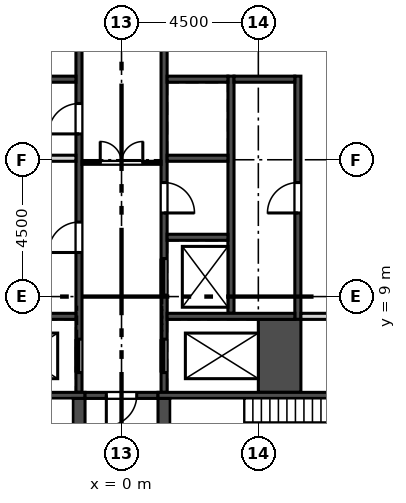
"""IFC4 building model, lengths in metres.
Left out: names, types, materials, properties, quantities, classifications, styles, units other than length and angle.
Written with IfcOpenShell. Run it as: python <this file> out.ifc"""

import sys

from ifc_helpers import new_model, si_unit, direction, frame, frame_2d, origin, place, context, subcontext, project, spatial, rectangle, extrude, element, fill, save


model = new_model("IFC4")
c1 = context("Model", 3, precision=1e-05, world=origin(), true_north=direction((0.0, 1.0)))
c2 = subcontext(c1, "Body", "Model", "MODEL_VIEW")
j1 = project(units=[si_unit("LENGTHUNIT", "METRE"), si_unit("PLANEANGLEUNIT", "RADIAN")], contexts=[c1])
p1 = place(None, origin())
s1 = spatial("IfcSite", under=j1, at=p1, CompositionType="ELEMENT")
p2 = place(p1, origin())
s2 = spatial("IfcBuilding", under=s1, at=p2, CompositionType="ELEMENT")
p3 = place(p2, frame((0.0, 0.0, 335.1)))
s3 = spatial("IfcBuildingStorey", under=s2, at=p3, CompositionType="ELEMENT", Elevation=335.1)
p4 = place(p3, frame((23.788, 7.709, 0.0), z_axis=(0.0, 0.0, 1.0), x_axis=(-0.500001731347, 0.866024404189, 0.0)))
e1 = element("IfcWall", 1, at=p4, inside=s3, PredefinedType="SOLIDWALL", context=c2, shape_type="SweptSolid", body=[
    extrude(rectangle(XDim=38.87, YDim=0.34, at=frame_2d((19.435, 0.0))), origin(), (0.0, 0.0, 1.0), 3.8),
])
p5 = place(p4, frame((3.218, 0.0, 0.9)))
e2 = element("IfcOpeningElement", 2, at=p5, cuts=e1, PredefinedType="OPENING", context=c2, shape_type="SweptSolid", body=[
    extrude(rectangle(XDim=1.885, YDim=2.6, at=frame_2d((0.942, 1.3))), frame((0.0, 0.18, 0.0), z_axis=(0.0, -1.0, 0.0), x_axis=(1.0, 0.0, 0.0)), (0.0, 0.0, 1.0), 0.36),
])
p6 = place(p4, frame((6.218, 0.0, 0.9)))
e3 = element("IfcOpeningElement", 3, at=p6, cuts=e1, PredefinedType="OPENING", context=c2, shape_type="SweptSolid", body=[
    extrude(rectangle(XDim=1.885, YDim=2.6, at=frame_2d((0.942, 1.3))), frame((0.0, 0.18, 0.0), z_axis=(0.0, -1.0, 0.0), x_axis=(1.0, 0.0, 0.0)), (0.0, 0.0, 1.0), 0.36),
])
p7 = place(p4, frame((9.218, 0.0, 0.9)))
e4 = element("IfcOpeningElement", 4, at=p7, cuts=e1, PredefinedType="OPENING", context=c2, shape_type="SweptSolid", body=[
    extrude(rectangle(XDim=1.885, YDim=2.6, at=frame_2d((0.942, 1.3))), frame((0.0, 0.18, 0.0), z_axis=(0.0, -1.0, 0.0), x_axis=(1.0, 0.0, 0.0)), (0.0, 0.0, 1.0), 0.36),
])
p8 = place(p4, frame((12.218, 0.0, 0.9)))
e5 = element("IfcOpeningElement", 5, at=p8, cuts=e1, PredefinedType="OPENING", context=c2, shape_type="SweptSolid", body=[
    extrude(rectangle(XDim=1.885, YDim=2.6, at=frame_2d((0.942, 1.3))), frame((0.0, 0.18, 0.0), z_axis=(0.0, -1.0, 0.0), x_axis=(1.0, 0.0, 0.0)), (0.0, 0.0, 1.0), 0.36),
])
p9 = place(p4, frame((15.218, 0.0, 0.9)))
e6 = element("IfcOpeningElement", 6, at=p9, cuts=e1, PredefinedType="OPENING", context=c2, shape_type="SweptSolid", body=[
    extrude(rectangle(XDim=1.885, YDim=2.6, at=frame_2d((0.942, 1.3))), frame((0.0, 0.18, 0.0), z_axis=(0.0, -1.0, 0.0), x_axis=(1.0, 0.0, 0.0)), (0.0, 0.0, 1.0), 0.36),
])
p10 = place(p4, frame((18.218, 0.0, 0.9)))
e7 = element("IfcOpeningElement", 7, at=p10, cuts=e1, PredefinedType="OPENING", context=c2, shape_type="SweptSolid", body=[
    extrude(rectangle(XDim=1.885, YDim=2.6, at=frame_2d((0.942, 1.3))), frame((0.0, 0.18, 0.0), z_axis=(0.0, -1.0, 0.0), x_axis=(1.0, 0.0, 0.0)), (0.0, 0.0, 1.0), 0.36),
])
p11 = place(p4, frame((21.218, 0.0, 0.9)))
e8 = element("IfcOpeningElement", 8, at=p11, cuts=e1, PredefinedType="OPENING", context=c2, shape_type="SweptSolid", body=[
    extrude(rectangle(XDim=1.885, YDim=2.6, at=frame_2d((0.942, 1.3))), frame((0.0, 0.18, 0.0), z_axis=(0.0, -1.0, 0.0), x_axis=(1.0, 0.0, 0.0)), (0.0, 0.0, 1.0), 0.36),
])
p12 = place(p4, frame((24.218, 0.0, 0.9)))
e9 = element("IfcOpeningElement", 9, at=p12, cuts=e1, PredefinedType="OPENING", context=c2, shape_type="SweptSolid", body=[
    extrude(rectangle(XDim=1.885, YDim=2.6, at=frame_2d((0.942, 1.3))), frame((0.0, 0.18, 0.0), z_axis=(0.0, -1.0, 0.0), x_axis=(1.0, 0.0, 0.0)), (0.0, 0.0, 1.0), 0.36),
])
p13 = place(p4, frame((27.218, 0.0, 0.9)))
e10 = element("IfcOpeningElement", 10, at=p13, cuts=e1, PredefinedType="OPENING", context=c2, shape_type="SweptSolid", body=[
    extrude(rectangle(XDim=1.885, YDim=2.6, at=frame_2d((0.942, 1.3))), frame((0.0, 0.18, 0.0), z_axis=(0.0, -1.0, 0.0), x_axis=(1.0, 0.0, 0.0)), (0.0, 0.0, 1.0), 0.36),
])
p14 = place(p4, frame((30.218, 0.0, 0.9)))
e11 = element("IfcOpeningElement", 11, at=p14, cuts=e1, PredefinedType="OPENING", context=c2, shape_type="SweptSolid", body=[
    extrude(rectangle(XDim=1.885, YDim=2.6, at=frame_2d((0.942, 1.3))), frame((0.0, 0.18, 0.0), z_axis=(0.0, -1.0, 0.0), x_axis=(1.0, 0.0, 0.0)), (0.0, 0.0, 1.0), 0.36),
])
p15 = place(p4, frame((33.218, 0.0, 0.9)))
e12 = element("IfcOpeningElement", 12, at=p15, cuts=e1, PredefinedType="OPENING", context=c2, shape_type="SweptSolid", body=[
    extrude(rectangle(XDim=1.885, YDim=2.6, at=frame_2d((0.942, 1.3))), frame((0.0, 0.18, 0.0), z_axis=(0.0, -1.0, 0.0), x_axis=(1.0, 0.0, 0.0)), (0.0, 0.0, 1.0), 0.36),
])
p16 = place(p4, frame((1.051, 0.0, 0.9)))
e13 = element("IfcOpeningElement", 13, at=p16, cuts=e1, PredefinedType="OPENING", context=c2, shape_type="SweptSolid", body=[
    extrude(rectangle(XDim=1.115, YDim=2.4, at=frame_2d((0.558, 1.2))), frame((0.0, 0.18, 0.0), z_axis=(0.0, -1.0, 0.0), x_axis=(1.0, 0.0, 0.0)), (0.0, 0.0, 1.0), 0.36),
])
p17 = place(p4, frame((36.429, 0.0, 0.9)))
e14 = element("IfcOpeningElement", 14, at=p17, cuts=e1, PredefinedType="OPENING", context=c2, shape_type="SweptSolid", body=[
    extrude(rectangle(XDim=1.115, YDim=2.4, at=frame_2d((0.558, 1.2))), frame((0.0, 0.18, 0.0), z_axis=(0.0, -1.0, 0.0), x_axis=(1.0, 0.0, 0.0)), (0.0, 0.0, 1.0), 0.36),
])
p18 = place(p3, frame((5.8, 8.25, -0.4), z_axis=(0.0, 0.0, 1.0), x_axis=(0.0, 1.0, 0.0)))
e15 = element("IfcWall", 15, at=p18, inside=s3, PredefinedType="SOLIDWALL", context=c2, shape_type="SweptSolid", body=[
    extrude(rectangle(XDim=8.0, YDim=0.2, at=frame_2d((4.0, 0.0))), origin(), (0.0, 0.0, 1.0), 4.2),
])
p19 = place(p18, frame((3.5, 0.0, 0.4)))
e16 = element("IfcOpeningElement", 16, at=p19, cuts=e15, PredefinedType="OPENING", context=c2, shape_type="SweptSolid", body=[
    extrude(rectangle(XDim=1.0, YDim=2.1, at=frame_2d((0.5, 1.05))), frame((0.0, 0.11, 0.0), z_axis=(0.0, -1.0, 0.0), x_axis=(1.0, 0.0, 0.0)), (0.0, 0.0, 1.0), 0.22),
])
p20 = place(p3, frame((3.6, 8.45, -0.4), z_axis=(0.0, 0.0, 1.0), x_axis=(0.0, 1.0, 0.0)))
e17 = element("IfcWall", 17, at=p20, inside=s3, PredefinedType="SOLIDWALL", context=c2, shape_type="SweptSolid", body=[
    extrude(rectangle(XDim=7.8, YDim=0.2, at=frame_2d((3.9, 0.0))), origin(), (0.0, 0.0, 1.0), 4.2),
])
p21 = place(p3, frame((-1.4, 5.85, -0.4), z_axis=(0.0, 0.0, 1.0), x_axis=(0.0, 1.0, 0.0)))
e18 = element("IfcWall", 18, at=p21, inside=s3, PredefinedType="SOLIDWALL", context=c2, shape_type="SweptSolid", body=[
    extrude(rectangle(XDim=11.75, YDim=0.2, at=frame_2d((5.875, 0.0))), origin(), (0.0, 0.0, 1.0), 4.2),
])
p22 = place(p21, frame((0.65, 0.0, 0.4)))
e19 = element("IfcOpeningElement", 19, at=p22, cuts=e18, PredefinedType="OPENING", context=c2, shape_type="SweptSolid", body=[
    extrude(rectangle(XDim=1.1, YDim=2.1, at=frame_2d((0.55, 1.05))), frame((0.0, 0.11, 0.0), z_axis=(0.0, -1.0, 0.0), x_axis=(1.0, 0.0, 0.0)), (0.0, 0.0, 1.0), 0.22),
])
p23 = place(p21, frame((4.6, 0.0, 0.4)))
e20 = element("IfcOpeningElement", 20, at=p23, cuts=e18, PredefinedType="OPENING", context=c2, shape_type="SweptSolid", body=[
    extrude(rectangle(XDim=1.0, YDim=2.1, at=frame_2d((0.5, 1.05))), frame((0.0, 0.11, 0.0), z_axis=(0.0, -1.0, 0.0), x_axis=(1.0, 0.0, 0.0)), (0.0, 0.0, 1.0), 0.22),
])
p24 = place(p21, frame((8.5, 0.0, 0.4)))
e21 = element("IfcOpeningElement", 21, at=p24, cuts=e18, PredefinedType="OPENING", context=c2, shape_type="SweptSolid", body=[
    extrude(rectangle(XDim=1.0, YDim=2.1, at=frame_2d((0.5, 1.05))), frame((0.0, 0.11, 0.0), z_axis=(0.0, -1.0, 0.0), x_axis=(1.0, 0.0, 0.0)), (0.0, 0.0, 1.0), 0.22),
])
p25 = place(p3, frame((1.4, 5.85, -0.4), z_axis=(0.0, 0.0, 1.0), x_axis=(0.0, 1.0, 0.0)))
e22 = element("IfcWall", 22, at=p25, inside=s3, PredefinedType="SOLIDWALL", context=c2, shape_type="SweptSolid", body=[
    extrude(rectangle(XDim=11.75, YDim=0.2, at=frame_2d((5.875, 0.0))), origin(), (0.0, 0.0, 1.0), 4.2),
])
p26 = place(p25, frame((3.2, 0.0, 0.4)))
e23 = element("IfcOpeningElement", 23, at=p26, cuts=e22, PredefinedType="OPENING", context=c2, shape_type="SweptSolid", body=[
    extrude(rectangle(XDim=1.2, YDim=2.1, at=frame_2d((0.6, 1.05))), frame((0.0, 0.11, 0.0), z_axis=(0.0, -1.0, 0.0), x_axis=(1.0, 0.0, 0.0)), (0.0, 0.0, 1.0), 0.22),
])
p27 = place(p25, frame((0.65, 0.0, 0.4)))
e24 = element("IfcOpeningElement", 24, at=p27, cuts=e22, PredefinedType="OPENING", context=c2, shape_type="SweptSolid", body=[
    extrude(rectangle(XDim=1.1, YDim=2.1, at=frame_2d((0.55, 1.05))), frame((0.0, 0.11, 0.0), z_axis=(0.0, -1.0, 0.0), x_axis=(1.0, 0.0, 0.0)), (0.0, 0.0, 1.0), 0.22),
])
p28 = place(p25, frame((5.9, 0.0, 0.4)))
e25 = element("IfcOpeningElement", 25, at=p28, cuts=e22, PredefinedType="OPENING", context=c2, shape_type="SweptSolid", body=[
    extrude(rectangle(XDim=1.0, YDim=2.1, at=frame_2d((0.5, 1.05))), frame((0.0, 0.11, 0.0), z_axis=(0.0, -1.0, 0.0), x_axis=(1.0, 0.0, 0.0)), (0.0, 0.0, 1.0), 0.22),
])
p29 = place(p3, frame((5.2, 5.85, -0.4), z_axis=(0.0, 0.0, 1.0), x_axis=(0.0, 1.0, 0.0)))
e26 = element("IfcWall", 26, at=p29, inside=s3, PredefinedType="SOLIDWALL", context=c2, shape_type="SweptSolid", body=[
    extrude(rectangle(XDim=2.4, YDim=1.4, at=frame_2d((1.2, 0.0))), origin(), (0.0, 0.0, 1.0), 4.2),
])
for number, where, z_axis, x_axis in (
    (27, (-5.7, 8.35, -0.4), (0.0, 0.0, 1.0), (1.0, 0.0, 0.0)),
    (28, (1.5, 8.35, -0.4), (0.0, 0.0, 1.0), (1.0, 0.0, 0.0)),
):
    element("IfcWall", number, at=place(p3, frame(where, z_axis=z_axis, x_axis=x_axis)), inside=s3, PredefinedType="SOLIDWALL", context=c2, shape_type="SweptSolid", body=[
        extrude(rectangle(XDim=4.2, YDim=0.2, at=frame_2d((2.1, 0.0))), origin(), (0.0, 0.0, 1.0), 4.2),
    ])
p30 = place(p3, frame((-12.6, 5.75, -0.4), z_axis=(0.0, 0.0, 1.0), x_axis=(1.0, 0.0, 0.0)))
e29 = element("IfcWall", 29, at=p30, inside=s3, PredefinedType="SOLIDWALL", context=c2, shape_type="SweptSolid", body=[
    extrude(rectangle(XDim=11.4, YDim=0.2, at=frame_2d((5.7, 0.0))), origin(), (0.0, 0.0, 1.0), 4.2),
])
p31 = place(p3, frame((-1.2, 5.75, -0.4), z_axis=(0.0, 0.0, 1.0), x_axis=(1.0, 0.0, 0.0)))
e30 = element("IfcWall", 30, at=p31, inside=s3, PredefinedType="SOLIDWALL", context=c2, shape_type="SweptSolid", body=[
    extrude(rectangle(XDim=2.4, YDim=0.2, at=frame_2d((1.2, 0.0))), origin(), (0.0, 0.0, 1.0), 4.2),
])
p32 = place(p31, frame((0.7, 0.0, 0.4)))
e31 = element("IfcOpeningElement", 31, at=p32, cuts=e30, PredefinedType="OPENING", context=c2, shape_type="SweptSolid", body=[
    extrude(rectangle(XDim=1.0, YDim=2.1, at=frame_2d((0.5, 1.05))), frame((0.0, 0.11, 0.0), z_axis=(0.0, -1.0, 0.0), x_axis=(1.0, 0.0, 0.0)), (0.0, 0.0, 1.0), 0.22),
])
p33 = place(p3, frame((1.2, 5.75, -0.4), z_axis=(0.0, 0.0, 1.0), x_axis=(1.0, 0.0, 0.0)))
e32 = element("IfcWall", 32, at=p33, inside=s3, PredefinedType="SOLIDWALL", context=c2, shape_type="SweptSolid", body=[
    extrude(rectangle(XDim=11.4, YDim=0.2, at=frame_2d((5.7, 0.0))), origin(), (0.0, 0.0, 1.0), 4.2),
])
for number, where, z_axis, x_axis in (
    (33, (-1.4, 2.25, -0.4), (0.0, 0.0, 1.0), (0.0, 1.0, 0.0)),
    (34, (1.4, 2.25, -0.4), (0.0, 0.0, 1.0), (0.0, 1.0, 0.0)),
):
    element("IfcWall", number, at=place(p3, frame(where, z_axis=z_axis, x_axis=x_axis)), inside=s3, PredefinedType="SOLIDWALL", context=c2, shape_type="SweptSolid", body=[
        extrude(rectangle(XDim=3.4, YDim=0.4, at=frame_2d((1.7, 0.0))), origin(), (0.0, 0.0, 1.0), 4.2),
    ])
p34 = place(p3, frame((-3.5, 13.55, 0.0), z_axis=(0.0, 0.0, 1.0), x_axis=(1.0, 0.0, 0.0)))
e35 = element("IfcWall", 35, at=p34, inside=s3, PredefinedType="SOLIDWALL", context=c2, shape_type="SweptSolid", body=[
    extrude(rectangle(XDim=2.0, YDim=0.2, at=frame_2d((1.0, 0.0))), origin(), (0.0, 0.0, 1.0), 3.8),
])
for number, where, z_axis, x_axis in (
    (36, (-3.5, 16.15, -0.4), (0.0, 0.0, 1.0), (1.0, 0.0, 0.0)),
    (37, (3.7, 16.15, -0.4), (0.0, 0.0, 1.0), (1.0, 0.0, 0.0)),
    (38, (1.5, 10.95, -0.4), (0.0, 0.0, 1.0), (1.0, 0.0, 0.0)),
    (39, (1.5, 13.55, -0.4), (0.0, 0.0, 1.0), (1.0, 0.0, 0.0)),
    (40, (1.5, 16.15, -0.4), (0.0, 0.0, 1.0), (1.0, 0.0, 0.0)),
):
    element("IfcWall", number, at=place(p3, frame(where, z_axis=z_axis, x_axis=x_axis)), inside=s3, PredefinedType="SOLIDWALL", context=c2, shape_type="SweptSolid", body=[
        extrude(rectangle(XDim=2.0, YDim=0.2, at=frame_2d((1.0, 0.0))), origin(), (0.0, 0.0, 1.0), 4.2),
    ])
p35 = place(p3, frame((5.9, 8.35, 0.0), z_axis=(0.0, 0.0, 1.0), x_axis=(1.0, 0.0, 0.0)))
e41 = element("IfcWall", 41, at=p35, inside=s3, PredefinedType="SOLIDWALL", context=c2, shape_type="SweptSolid", body=[
    extrude(rectangle(XDim=2.8, YDim=0.2, at=frame_2d((1.4, 0.0))), origin(), (0.0, 0.0, 1.0), 3.8),
])
p36 = place(p35, frame((0.9, 0.0, 0.0)))
e42 = element("IfcOpeningElement", 42, at=p36, cuts=e41, PredefinedType="OPENING", context=c2, shape_type="SweptSolid", body=[
    extrude(rectangle(XDim=1.0, YDim=2.1, at=frame_2d((0.5, 1.05))), frame((0.0, 0.11, 0.0), z_axis=(0.0, -1.0, 0.0), x_axis=(1.0, 0.0, 0.0)), (0.0, 0.0, 1.0), 0.22),
])
p37 = place(p3, frame((-1.3, 13.4, 0.0), z_axis=(0.0, 0.0, 1.0), x_axis=(1.0, 0.0, 0.0)))
e43 = element("IfcWall", 43, at=p37, inside=s3, PredefinedType="PARTITIONING", context=c2, shape_type="SweptSolid", body=[
    extrude(rectangle(XDim=2.6, YDim=0.1, at=frame_2d((1.3, 0.0))), origin(), (0.0, 0.0, 1.0), 3.8),
])
p38 = place(p37, frame((0.6, 0.0, 0.0)))
e44 = element("IfcOpeningElement", 44, at=p38, cuts=e43, PredefinedType="OPENING", context=c2, shape_type="SweptSolid", body=[
    extrude(rectangle(XDim=1.4, YDim=2.1, at=frame_2d((0.7, 1.05))), frame((0.0, 0.06, 0.0), z_axis=(0.0, -1.0, 0.0), x_axis=(1.0, 0.0, 0.0)), (0.0, 0.0, 1.0), 0.12),
])
p39 = place(p22, origin())
e45 = element("IfcDoor", 45, at=p39, inside=s3, OperationType="SLIDING_TO_RIGHT", PredefinedType="DOOR", context=c2, shape_type="SweptSolid", body=[
    extrude(rectangle(XDim=1.1, YDim=2.1, at=frame_2d((0.55, 1.05))), frame((0.0, 0.025, 0.0), z_axis=(0.0, -1.0, 0.0), x_axis=(1.0, 0.0, 0.0)), (0.0, 0.0, 1.0), 0.05),
])
fill(e19, e45)
p40 = place(p26, origin())
e46 = element("IfcDoor", 46, at=p40, inside=s3, OperationType="SLIDING_TO_LEFT", PredefinedType="DOOR", context=c2, shape_type="SweptSolid", body=[
    extrude(rectangle(XDim=1.2, YDim=2.1, at=frame_2d((0.6, 1.05))), frame((0.0, 0.025, 0.0), z_axis=(0.0, -1.0, 0.0), x_axis=(1.0, 0.0, 0.0)), (0.0, 0.0, 1.0), 0.05),
])
fill(e23, e46)
p41 = place(p27, origin())
e47 = element("IfcDoor", 47, at=p41, inside=s3, OperationType="SLIDING_TO_RIGHT", PredefinedType="DOOR", context=c2, shape_type="SweptSolid", body=[
    extrude(rectangle(XDim=1.1, YDim=2.1, at=frame_2d((0.55, 1.05))), frame((0.0, 0.025, 0.0), z_axis=(0.0, -1.0, 0.0), x_axis=(1.0, 0.0, 0.0)), (0.0, 0.0, 1.0), 0.05),
])
fill(e24, e47)
p42 = place(p23, origin())
e48 = element("IfcDoor", 48, at=p42, inside=s3, OperationType="SINGLE_SWING_LEFT", PredefinedType="DOOR", context=c2, shape_type="SweptSolid", body=[
    extrude(rectangle(XDim=1.0, YDim=2.1, at=frame_2d((0.5, 1.05))), frame((0.0, 0.025, 0.0), z_axis=(0.0, -1.0, 0.0), x_axis=(1.0, 0.0, 0.0)), (0.0, 0.0, 1.0), 0.05),
])
fill(e20, e48)
p43 = place(p24, origin())
e49 = element("IfcDoor", 49, at=p43, inside=s3, OperationType="SINGLE_SWING_LEFT", PredefinedType="DOOR", context=c2, shape_type="SweptSolid", body=[
    extrude(rectangle(XDim=1.0, YDim=2.1, at=frame_2d((0.5, 1.05))), frame((0.0, 0.025, 0.0), z_axis=(0.0, -1.0, 0.0), x_axis=(1.0, 0.0, 0.0)), (0.0, 0.0, 1.0), 0.05),
])
fill(e21, e49)
p44 = place(p19, origin())
e50 = element("IfcDoor", 50, at=p44, inside=s3, OperationType="SINGLE_SWING_LEFT", PredefinedType="DOOR", context=c2, shape_type="SweptSolid", body=[
    extrude(rectangle(XDim=1.0, YDim=2.1, at=frame_2d((0.5, 1.05))), frame((0.0, 0.025, 0.0), z_axis=(0.0, -1.0, 0.0), x_axis=(1.0, 0.0, 0.0)), (0.0, 0.0, 1.0), 0.05),
])
fill(e16, e50)
p45 = place(p28, frame((1.0, 0.0, 0.0), z_axis=(0.0, 0.0, 1.0), x_axis=(-1.0, 0.0, 0.0)))
e51 = element("IfcDoor", 51, at=p45, inside=s3, OperationType="SINGLE_SWING_RIGHT", PredefinedType="DOOR", context=c2, shape_type="SweptSolid", body=[
    extrude(rectangle(XDim=1.0, YDim=2.1, at=frame_2d((0.5, 1.05))), frame((0.0, 0.025, 0.0), z_axis=(0.0, -1.0, 0.0), x_axis=(1.0, 0.0, 0.0)), (0.0, 0.0, 1.0), 0.05),
])
fill(e25, e51)
p46 = place(p32, frame((1.0, 0.0, 0.0), z_axis=(0.0, 0.0, 1.0), x_axis=(-1.0, 0.0, 0.0)))
e52 = element("IfcDoor", 52, at=p46, inside=s3, OperationType="SINGLE_SWING_RIGHT", PredefinedType="DOOR", context=c2, shape_type="SweptSolid", body=[
    extrude(rectangle(XDim=1.0, YDim=2.1, at=frame_2d((0.5, 1.05))), frame((0.0, 0.025, 0.0), z_axis=(0.0, -1.0, 0.0), x_axis=(1.0, 0.0, 0.0)), (0.0, 0.0, 1.0), 0.05),
])
fill(e31, e52)
p47 = place(p38, origin())
e53 = element("IfcDoor", 53, at=p47, inside=s3, OperationType="DOUBLE_DOOR_SINGLE_SWING", PredefinedType="DOOR", context=c2, shape_type="SweptSolid", body=[
    extrude(rectangle(XDim=1.4, YDim=2.1, at=frame_2d((0.7, 1.05))), frame((0.0, 0.025, 0.0), z_axis=(0.0, -1.0, 0.0), x_axis=(1.0, 0.0, 0.0)), (0.0, 0.0, 1.0), 0.05),
])
fill(e44, e53)
save(model, sys.argv[1])
